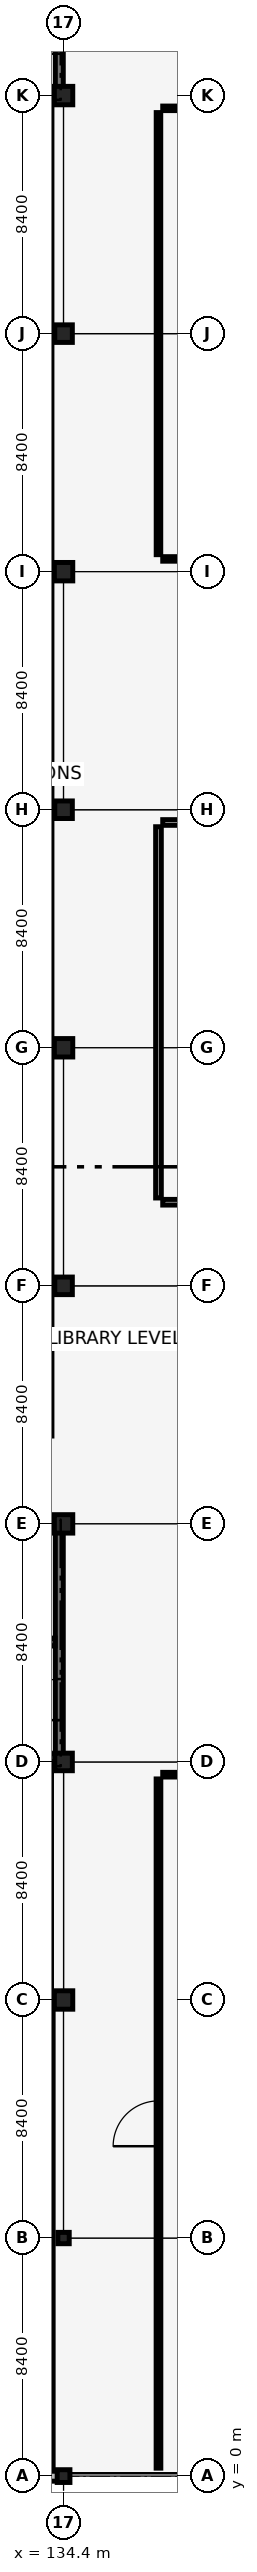
"""IFC4 building model, lengths in metres.
Left out: names, types, materials, properties, quantities, classifications, styles, units other than length and angle.
Written with IfcOpenShell. Run it as: python <this file> out.ifc"""

import sys

from ifc_helpers import new_model, si_unit, direction, frame, frame_2d, origin, origin_2d, place, context, subcontext, project, spatial, rectangle, extrude, element, fill, save


model = new_model("IFC4")
c1 = context("Model", 3, precision=1e-05, world=origin(), true_north=direction((0.0, 1.0)))
c2 = subcontext(c1, "Body", "Model", "MODEL_VIEW")
j1 = project(units=[si_unit("LENGTHUNIT", "METRE"), si_unit("PLANEANGLEUNIT", "RADIAN")], contexts=[c1])
p1 = place(None, origin())
s1 = spatial("IfcSite", under=j1, at=p1, CompositionType="ELEMENT")
p2 = place(p1, origin())
s2 = spatial("IfcBuilding", under=s1, at=p2, CompositionType="ELEMENT")
p3 = place(p2, frame((0.0, 0.0, 13.94)))
s3 = spatial("IfcBuildingStorey", under=s2, at=p3, CompositionType="ELEMENT", Elevation=13.94)
p4 = place(p3, frame((126.15, 25.35, 0.0), z_axis=(0.0, 0.0, 1.0), x_axis=(1.0, 0.0, 0.0)))
e1 = element("IfcWall", 1, at=p4, inside=s3, PredefinedType="SHEAR", context=c2, shape_type="SweptSolid", body=[
    extrude(rectangle(XDim=8.1, YDim=0.28, at=frame_2d((4.05, 0.0))), origin(), (0.0, 0.0, 1.0), 3.78),
])
p5 = place(p4, frame((0.485, 0.0, 0.0)))
e2 = element("IfcOpeningElement", 2, at=p5, cuts=e1, PredefinedType="OPENING", context=c2, shape_type="SweptSolid", body=[
    extrude(rectangle(XDim=1.0, YDim=2.15, at=frame_2d((0.5, 1.075))), frame((0.0, 0.15, 0.0), z_axis=(0.0, -1.0, 0.0), x_axis=(1.0, 0.0, 0.0)), (0.0, 0.0, 1.0), 0.3),
])
p6 = place(p3, frame((126.15, 33.45, 0.0), z_axis=(0.0, 0.0, 1.0), x_axis=(1.0, 0.0, 0.0)))
e3 = element("IfcWall", 3, at=p6, inside=s3, PredefinedType="SHEAR", context=c2, shape_type="SweptSolid", body=[
    extrude(rectangle(XDim=8.1, YDim=0.28, at=frame_2d((4.05, 0.0))), origin(), (0.0, 0.0, 1.0), 3.78),
])
p7 = place(p3, frame((134.25, 25.35, 0.0), z_axis=(0.0, 0.0, 1.0), x_axis=(0.0, 1.0, 0.0)))
e4 = element("IfcWall", 4, at=p7, inside=s3, PredefinedType="SHEAR", context=c2, shape_type="SweptSolid", body=[
    extrude(rectangle(XDim=8.1, YDim=0.28, at=frame_2d((4.05, 0.0))), origin(), (0.0, 0.0, 1.0), 3.78),
])
p8 = place(p7, frame((1.325, 0.0, 0.0)))
e5 = element("IfcOpeningElement", 5, at=p8, cuts=e4, PredefinedType="OPENING", context=c2, shape_type="SweptSolid", body=[
    extrude(rectangle(XDim=1.45, YDim=2.15, at=frame_2d((0.725, 1.075))), frame((0.0, 0.15, 0.0), z_axis=(0.0, -1.0, 0.0), x_axis=(1.0, 0.0, 0.0)), (0.0, 0.0, 1.0), 0.3),
])
p9 = place(p3, frame((126.3, 29.43, 0.0), z_axis=(0.0, 0.0, 1.0), x_axis=(1.0, 0.0, 0.0)))
e6 = element("IfcWall", 6, at=p9, inside=s3, PredefinedType="SHEAR", context=c2, shape_type="SweptSolid", body=[
    extrude(rectangle(XDim=7.8, YDim=0.28, at=frame_2d((3.9, 0.0))), origin(), (0.0, 0.0, 1.0), 3.78),
])
p10 = place(p9, frame((6.2, 0.0, 0.0)))
e7 = element("IfcOpeningElement", 7, at=p10, cuts=e6, PredefinedType="OPENING", context=c2, shape_type="SweptSolid", body=[
    extrude(rectangle(XDim=1.35, YDim=2.15, at=frame_2d((0.675, 1.075))), frame((0.0, 0.15, 0.0), z_axis=(0.0, -1.0, 0.0), x_axis=(1.0, 0.0, 0.0)), (0.0, 0.0, 1.0), 0.3),
])
p11 = place(p3, frame((126.15, 84.15, 0.0), z_axis=(0.0, 0.0, 1.0), x_axis=(1.0, 0.0, 0.0)))
e8 = element("IfcWall", 8, at=p11, inside=s3, PredefinedType="SHEAR", context=c2, shape_type="SweptSolid", body=[
    extrude(rectangle(XDim=8.1, YDim=0.28, at=frame_2d((4.05, 0.0))), origin(), (0.0, 0.0, 1.0), 3.78),
])
p12 = place(p11, frame((0.485, 0.0, 0.0)))
e9 = element("IfcOpeningElement", 9, at=p12, cuts=e8, PredefinedType="OPENING", context=c2, shape_type="SweptSolid", body=[
    extrude(rectangle(XDim=1.0, YDim=2.15, at=frame_2d((0.5, 1.075))), frame((0.0, 0.15, 0.0), z_axis=(0.0, -1.0, 0.0), x_axis=(1.0, 0.0, 0.0)), (0.0, 0.0, 1.0), 0.3),
])
p13 = place(p3, frame((134.25, 84.15, 0.0), z_axis=(0.0, 0.0, 1.0), x_axis=(0.0, 1.0, 0.0)))
e10 = element("IfcWall", 10, at=p13, inside=s3, PredefinedType="SHEAR", context=c2, shape_type="SweptSolid", body=[
    extrude(rectangle(XDim=8.1, YDim=0.28, at=frame_2d((4.05, 0.0))), origin(), (0.0, 0.0, 1.0), 3.78),
])
p14 = place(p13, frame((1.325, 0.0, 0.0)))
e11 = element("IfcOpeningElement", 11, at=p14, cuts=e10, PredefinedType="OPENING", context=c2, shape_type="SweptSolid", body=[
    extrude(rectangle(XDim=1.45, YDim=2.15, at=frame_2d((0.725, 1.075))), frame((0.0, 0.15, 0.0), z_axis=(0.0, -1.0, 0.0), x_axis=(1.0, 0.0, 0.0)), (0.0, 0.0, 1.0), 0.3),
])
p15 = place(p3, frame((134.4, 0.0, 0.0), z_axis=(0.0, 0.0, 1.0), x_axis=(1.0, 0.0, 0.0)))
e12 = element("IfcColumn", 12, at=p15, inside=s3, PredefinedType="COLUMN", context=c2, shape_type="SweptSolid", body=[
    extrude(rectangle(XDim=0.45, YDim=0.45, at=origin_2d()), origin(), (0.0, 0.0, 1.0), 3.78),
])
p16 = place(p3, frame((134.4, 8.4, 0.0), z_axis=(0.0, 0.0, 1.0), x_axis=(1.0, 0.0, 0.0)))
e13 = element("IfcColumn", 13, at=p16, inside=s3, PredefinedType="COLUMN", context=c2, shape_type="SweptSolid", body=[
    extrude(rectangle(XDim=0.4, YDim=0.4, at=origin_2d()), origin(), (0.0, 0.0, 1.0), 3.78),
])
p17 = place(p3, frame((134.4, 16.8, 0.0), z_axis=(0.0, 0.0, 1.0), x_axis=(1.0, 0.0, 0.0)))
e14 = element("IfcColumn", 14, at=p17, inside=s3, PredefinedType="COLUMN", context=c2, shape_type="SweptSolid", body=[
    extrude(rectangle(XDim=0.65, YDim=0.65, at=origin_2d()), origin(), (0.0, 0.0, 1.0), 3.78),
])
p18 = place(p3, frame((134.4, 25.2, 0.0), z_axis=(0.0, 0.0, 1.0), x_axis=(1.0, 0.0, 0.0)))
e15 = element("IfcColumn", 15, at=p18, inside=s3, PredefinedType="COLUMN", context=c2, shape_type="SweptSolid", body=[
    extrude(rectangle(XDim=0.62, YDim=0.62, at=origin_2d()), origin(), (0.0, 0.0, 1.0), 3.78),
])
p19 = place(p3, frame((134.4, 33.6, 0.0), z_axis=(0.0, 0.0, 1.0), x_axis=(1.0, 0.0, 0.0)))
e16 = element("IfcColumn", 16, at=p19, inside=s3, PredefinedType="COLUMN", context=c2, shape_type="SweptSolid", body=[
    extrude(rectangle(XDim=0.65, YDim=0.65, at=origin_2d()), origin(), (0.0, 0.0, 1.0), 3.78),
])
p20 = place(p3, frame((134.4, 42.0, 0.0), z_axis=(0.0, 0.0, 1.0), x_axis=(1.0, 0.0, 0.0)))
e17 = element("IfcColumn", 17, at=p20, inside=s3, PredefinedType="COLUMN", context=c2, shape_type="SweptSolid", body=[
    extrude(rectangle(XDim=0.62, YDim=0.62, at=origin_2d()), origin(), (0.0, 0.0, 1.0), 3.78),
])
p21 = place(p3, frame((134.4, 50.4, 0.0), z_axis=(0.0, 0.0, 1.0), x_axis=(1.0, 0.0, 0.0)))
e18 = element("IfcColumn", 18, at=p21, inside=s3, PredefinedType="COLUMN", context=c2, shape_type="SweptSolid", body=[
    extrude(rectangle(XDim=0.65, YDim=0.65, at=origin_2d()), origin(), (0.0, 0.0, 1.0), 3.78),
])
p22 = place(p3, frame((134.4, 58.8, 0.0), z_axis=(0.0, 0.0, 1.0), x_axis=(1.0, 0.0, 0.0)))
e19 = element("IfcColumn", 19, at=p22, inside=s3, PredefinedType="COLUMN", context=c2, shape_type="SweptSolid", body=[
    extrude(rectangle(XDim=0.62, YDim=0.62, at=origin_2d()), origin(), (0.0, 0.0, 1.0), 3.78),
])
p23 = place(p3, frame((134.4, 67.2, 0.0), z_axis=(0.0, 0.0, 1.0), x_axis=(1.0, 0.0, 0.0)))
e20 = element("IfcColumn", 20, at=p23, inside=s3, PredefinedType="COLUMN", context=c2, shape_type="SweptSolid", body=[
    extrude(rectangle(XDim=0.65, YDim=0.65, at=origin_2d()), origin(), (0.0, 0.0, 1.0), 3.78),
])
p24 = place(p3, frame((134.4, 75.6, 0.0), z_axis=(0.0, 0.0, 1.0), x_axis=(1.0, 0.0, 0.0)))
e21 = element("IfcColumn", 21, at=p24, inside=s3, PredefinedType="COLUMN", context=c2, shape_type="SweptSolid", body=[
    extrude(rectangle(XDim=0.62, YDim=0.62, at=origin_2d()), origin(), (0.0, 0.0, 1.0), 3.78),
])
p25 = place(p3, frame((134.4, 84.0, 0.0), z_axis=(0.0, 0.0, 1.0), x_axis=(1.0, 0.0, 0.0)))
e22 = element("IfcColumn", 22, at=p25, inside=s3, PredefinedType="COLUMN", context=c2, shape_type="SweptSolid", body=[
    extrude(rectangle(XDim=0.65, YDim=0.65, at=origin_2d()), origin(), (0.0, 0.0, 1.0), 3.78),
])
p26 = place(p3, frame((126.225, 0.0, 0.0), z_axis=(0.0, 0.0, 1.0), x_axis=(1.0, 0.0, 0.0)))
e23 = element("IfcWall", 23, at=p26, inside=s3, PredefinedType="SOLIDWALL", context=c2, shape_type="SweptSolid", body=[
    extrude(rectangle(XDim=7.965, YDim=0.36, at=frame_2d((3.982, 0.0))), origin(), (0.0, 0.0, 1.0), 3.78),
])
p27 = place(p26, frame((1.163, 0.0, 0.75)))
e24 = element("IfcOpeningElement", 24, at=p27, cuts=e23, PredefinedType="OPENING", context=c2, shape_type="SweptSolid", body=[
    extrude(rectangle(XDim=0.7, YDim=1.95, at=frame_2d((0.35, 0.975))), frame((0.0, 0.19, 0.0), z_axis=(0.0, -1.0, 0.0), x_axis=(1.0, 0.0, 0.0)), (0.0, 0.0, 1.0), 0.38),
])
p28 = place(p26, frame((2.756, 0.0, 0.75)))
e25 = element("IfcOpeningElement", 25, at=p28, cuts=e23, PredefinedType="OPENING", context=c2, shape_type="SweptSolid", body=[
    extrude(rectangle(XDim=0.7, YDim=1.95, at=frame_2d((0.35, 0.975))), frame((0.0, 0.19, 0.0), z_axis=(0.0, -1.0, 0.0), x_axis=(1.0, 0.0, 0.0)), (0.0, 0.0, 1.0), 0.38),
])
p29 = place(p26, frame((4.509, 0.0, 0.75)))
e26 = element("IfcOpeningElement", 26, at=p29, cuts=e23, PredefinedType="OPENING", context=c2, shape_type="SweptSolid", body=[
    extrude(rectangle(XDim=0.7, YDim=1.95, at=frame_2d((0.35, 0.975))), frame((0.0, 0.19, 0.0), z_axis=(0.0, -1.0, 0.0), x_axis=(1.0, 0.0, 0.0)), (0.0, 0.0, 1.0), 0.38),
])
p30 = place(p26, frame((6.102, 0.0, 0.75)))
e27 = element("IfcOpeningElement", 27, at=p30, cuts=e23, PredefinedType="OPENING", context=c2, shape_type="SweptSolid", body=[
    extrude(rectangle(XDim=0.7, YDim=1.95, at=frame_2d((0.35, 0.975))), frame((0.0, 0.19, 0.0), z_axis=(0.0, -1.0, 0.0), x_axis=(1.0, 0.0, 0.0)), (0.0, 0.0, 1.0), 0.38),
])
p31 = place(p3, frame((133.95, 0.18, 0.0), z_axis=(0.0, 0.0, 1.0), x_axis=(0.0, 1.0, 0.0)))
e28 = element("IfcWall", 28, at=p31, inside=s3, PredefinedType="PARTITIONING", context=c2, shape_type="SweptSolid", body=[
    extrude(rectangle(XDim=16.27, YDim=0.165, at=frame_2d((8.135, 0.0))), origin(), (0.0, 0.0, 1.0), 3.78),
])
p32 = place(p31, frame((4.401, 0.0, 0.0)))
e29 = element("IfcOpeningElement", 29, at=p32, cuts=e28, PredefinedType="OPENING", context=c2, shape_type="SweptSolid", body=[
    extrude(rectangle(XDim=1.6, YDim=2.25, at=frame_2d((0.8, 1.125))), frame((0.0, 0.093, 0.0), z_axis=(0.0, -1.0, 0.0), x_axis=(1.0, 0.0, 0.0)), (0.0, 0.0, 1.0), 0.185),
])
p33 = place(p3, frame((137.75, 0.28, 0.0), z_axis=(0.0, 0.0, 1.0), x_axis=(0.0, 1.0, 0.0)))
e30 = element("IfcWall", 30, at=p33, inside=s3, PredefinedType="PARTITIONING", context=c2, shape_type="SweptSolid", body=[
    extrude(rectangle(XDim=24.32, YDim=0.165, at=frame_2d((12.16, 0.0))), origin(), (0.0, 0.0, 1.0), 3.15),
])
p34 = place(p33, frame((11.36, 0.0, 0.0)))
e31 = element("IfcOpeningElement", 31, at=p34, cuts=e30, PredefinedType="OPENING", context=c2, shape_type="SweptSolid", body=[
    extrude(rectangle(XDim=1.6, YDim=2.25, at=frame_2d((0.8, 1.125))), frame((0.0, 0.093, 0.0), z_axis=(0.0, -1.0, 0.0), x_axis=(1.0, 0.0, 0.0)), (0.0, 0.0, 1.0), 0.185),
])
p35 = place(p3, frame((137.9, 24.75, 0.0), z_axis=(0.0, 0.0, 1.0), x_axis=(1.0, 0.0, 0.0)))
e32 = element("IfcWall", 32, at=p35, inside=s3, PredefinedType="PARTITIONING", context=c2, shape_type="SweptSolid", body=[
    extrude(rectangle(XDim=4.515, YDim=0.165, at=frame_2d((2.258, 0.0))), origin(), (0.0, 0.0, 1.0), 3.78),
])
p36 = place(p3, frame((137.9, 44.95, 0.0), z_axis=(0.0, 0.0, 1.0), x_axis=(1.0, 0.0, 0.0)))
e33 = element("IfcWall", 33, at=p36, inside=s3, PredefinedType="PARTITIONING", context=c2, shape_type="SweptSolid", body=[
    extrude(rectangle(XDim=12.65, YDim=0.2, at=frame_2d((6.325, 0.0))), origin(), (0.0, 0.0, 1.0), 3.35),
])
p37 = place(p36, frame((5.575, 0.0, 0.0)))
e34 = element("IfcOpeningElement", 34, at=p37, cuts=e33, PredefinedType="OPENING", context=c2, shape_type="SweptSolid", body=[
    extrude(rectangle(XDim=1.5, YDim=2.2, at=frame_2d((0.75, 1.1))), frame((0.0, 0.11, 0.0), z_axis=(0.0, -1.0, 0.0), x_axis=(1.0, 0.0, 0.0)), (0.0, 0.0, 1.0), 0.22),
])
p38 = place(p3, frame((137.75, 45.1, 0.0), z_axis=(0.0, 0.0, 1.0), x_axis=(0.0, 1.0, 0.0)))
e35 = element("IfcWall", 35, at=p38, inside=s3, PredefinedType="PARTITIONING", context=c2, shape_type="SweptSolid", body=[
    extrude(rectangle(XDim=13.1, YDim=0.2, at=frame_2d((6.55, 0.0))), origin(), (0.0, 0.0, 1.0), 3.05),
])
p39 = place(p3, frame((137.9, 58.35, 0.0), z_axis=(0.0, 0.0, 1.0), x_axis=(1.0, 0.0, 0.0)))
e36 = element("IfcWall", 36, at=p39, inside=s3, PredefinedType="PARTITIONING", context=c2, shape_type="SweptSolid", body=[
    extrude(rectangle(XDim=4.515, YDim=0.2, at=frame_2d((2.258, 0.0))), origin(), (0.0, 0.0, 1.0), 3.78),
])
p40 = place(p3, frame((137.9, 83.55, 0.0), z_axis=(0.0, 0.0, 1.0), x_axis=(1.0, 0.0, 0.0)))
e37 = element("IfcWall", 37, at=p40, inside=s3, PredefinedType="PARTITIONING", context=c2, shape_type="SweptSolid", body=[
    extrude(rectangle(XDim=13.27, YDim=0.16, at=frame_2d((6.635, 0.0))), origin(), (0.0, 0.0, 1.0), 3.1),
])
p41 = place(p40, frame((5.985, 0.0, 0.0)))
e38 = element("IfcOpeningElement", 38, at=p41, cuts=e37, PredefinedType="OPENING", context=c2, shape_type="SweptSolid", body=[
    extrude(rectangle(XDim=1.3, YDim=2.2, at=frame_2d((0.65, 1.1))), frame((0.0, 0.09, 0.0), z_axis=(0.0, -1.0, 0.0), x_axis=(1.0, 0.0, 0.0)), (0.0, 0.0, 1.0), 0.18),
])
p42 = place(p3, frame((137.75, 67.8, 0.0), z_axis=(0.0, 0.0, 1.0), x_axis=(0.0, 1.0, 0.0)))
e39 = element("IfcWall", 39, at=p42, inside=s3, PredefinedType="PARTITIONING", context=c2, shape_type="SweptSolid", body=[
    extrude(rectangle(XDim=15.6, YDim=0.16, at=frame_2d((7.8, 0.0))), origin(), (0.0, 0.0, 1.0), 3.13),
])
p43 = place(p3, frame((137.9, 67.65, 0.0), z_axis=(0.0, 0.0, 1.0), x_axis=(1.0, 0.0, 0.0)))
e40 = element("IfcWall", 40, at=p43, inside=s3, PredefinedType="PARTITIONING", context=c2, shape_type="SweptSolid", body=[
    extrude(rectangle(XDim=12.65, YDim=0.16, at=frame_2d((6.325, 0.0))), origin(), (0.0, 0.0, 1.0), 3.35),
])
p44 = place(p8, origin())
e41 = element("IfcDoor", 41, at=p44, inside=s3, OperationType="DOUBLE_DOOR_SINGLE_SWING", PredefinedType="DOOR", context=c2, shape_type="SweptSolid", body=[
    extrude(rectangle(XDim=1.45, YDim=2.15, at=frame_2d((0.725, 1.075))), frame((0.0, 0.025, 0.0), z_axis=(0.0, -1.0, 0.0), x_axis=(1.0, 0.0, 0.0)), (0.0, 0.0, 1.0), 0.05),
])
fill(e5, e41)
p45 = place(p14, origin())
e42 = element("IfcDoor", 42, at=p45, inside=s3, OperationType="DOUBLE_DOOR_SINGLE_SWING", PredefinedType="DOOR", context=c2, shape_type="SweptSolid", body=[
    extrude(rectangle(XDim=1.45, YDim=2.15, at=frame_2d((0.725, 1.075))), frame((0.0, 0.025, 0.0), z_axis=(0.0, -1.0, 0.0), x_axis=(1.0, 0.0, 0.0)), (0.0, 0.0, 1.0), 0.05),
])
fill(e11, e42)
p46 = place(p34, origin())
e43 = element("IfcDoor", 43, at=p46, inside=s3, OperationType="DOUBLE_DOOR_SINGLE_SWING", PredefinedType="DOOR", context=c2, shape_type="SweptSolid", body=[
    extrude(rectangle(XDim=1.6, YDim=2.25, at=frame_2d((0.8, 1.125))), frame((0.0, 0.025, 0.0), z_axis=(0.0, -1.0, 0.0), x_axis=(1.0, 0.0, 0.0)), (0.0, 0.0, 1.0), 0.05),
])
fill(e31, e43)
save(model, sys.argv[1])
